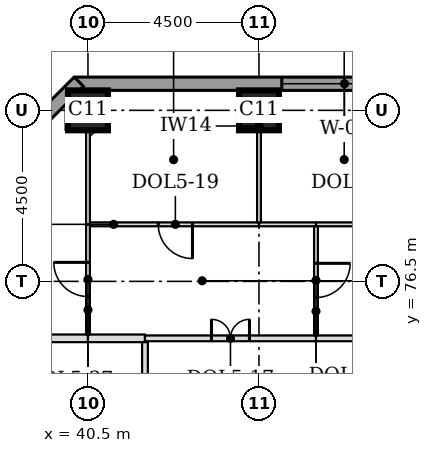
"""IFC4 building model, lengths in metres.
Left out: names, types, materials, properties, quantities, classifications, styles, units other than length and angle.
Written with IfcOpenShell. Run it as: python <this file> out.ifc"""

import sys

from ifc_helpers import new_model, si_unit, direction, frame, frame_2d, origin, origin_2d, place, context, subcontext, project, spatial, rectangle, extrude, element, fill, save


model = new_model("IFC4")
c1 = context("Model", 3, precision=1e-05, world=origin(), true_north=direction((0.0, 1.0)))
c2 = subcontext(c1, "Body", "Model", "MODEL_VIEW")
j1 = project(units=[si_unit("LENGTHUNIT", "METRE"), si_unit("PLANEANGLEUNIT", "RADIAN")], contexts=[c1])
p1 = place(None, origin())
s1 = spatial("IfcSite", under=j1, at=p1, CompositionType="ELEMENT")
p2 = place(p1, origin())
s2 = spatial("IfcBuilding", under=s1, at=p2, CompositionType="ELEMENT")
p3 = place(p2, frame((0.0, 0.0, 108.5)))
s3 = spatial("IfcBuildingStorey", under=s2, at=p3, CompositionType="ELEMENT", Elevation=108.5)
for number, where, z_axis, x_axis in (
    (1, (40.5, 81.0, 0.0), (0.0, 0.0, 1.0), (1.0, 0.0, 0.0)),
    (2, (45.0, 81.0, 0.0), (0.0, 0.0, 1.0), (1.0, 0.0, 0.0)),
):
    element("IfcColumn", number, at=place(p3, frame(where, z_axis=z_axis, x_axis=x_axis)), inside=s3, PredefinedType="COLUMN", context=c2, shape_type="SweptSolid", body=[
        extrude(rectangle(XDim=1.05, YDim=1.05, at=origin_2d()), origin(), (0.0, 0.0, 1.0), 3.7),
    ])
p4 = place(p3, frame((72.362, 81.7, 0.0), z_axis=(0.0, 0.0, 1.0), x_axis=(-1.0, 0.0, 0.0)))
e3 = element("IfcWall", 3, at=p4, inside=s3, PredefinedType="STANDARD", context=c2, shape_type="SweptSolid", body=[
    extrude(rectangle(XDim=32.225, YDim=0.35, at=frame_2d((16.112, 0.0))), origin(), (0.0, 0.0, 1.0), 3.525),
])
p5 = place(p4, frame((5.462, 0.0, 0.9)))
e4 = element("IfcOpeningElement", 4, at=p5, cuts=e3, PredefinedType="OPENING", context=c2, shape_type="SweptSolid", body=[
    extrude(rectangle(XDim=3.3, YDim=1.9, at=frame_2d((1.65, 0.95))), frame((0.0, 0.185, 0.0), z_axis=(0.0, -1.0, 0.0), x_axis=(1.0, 0.0, 0.0)), (0.0, 0.0, 1.0), 0.37),
])
p6 = place(p4, frame((9.962, 0.0, 0.9)))
e5 = element("IfcOpeningElement", 5, at=p6, cuts=e3, PredefinedType="OPENING", context=c2, shape_type="SweptSolid", body=[
    extrude(rectangle(XDim=3.3, YDim=1.9, at=frame_2d((1.65, 0.95))), frame((0.0, 0.185, 0.0), z_axis=(0.0, -1.0, 0.0), x_axis=(1.0, 0.0, 0.0)), (0.0, 0.0, 1.0), 0.37),
])
p7 = place(p4, frame((14.462, 0.0, 0.9)))
e6 = element("IfcOpeningElement", 6, at=p7, cuts=e3, PredefinedType="OPENING", context=c2, shape_type="SweptSolid", body=[
    extrude(rectangle(XDim=3.3, YDim=1.9, at=frame_2d((1.65, 0.95))), frame((0.0, 0.185, 0.0), z_axis=(0.0, -1.0, 0.0), x_axis=(1.0, 0.0, 0.0)), (0.0, 0.0, 1.0), 0.37),
])
p8 = place(p4, frame((18.962, 0.0, 0.9)))
e7 = element("IfcOpeningElement", 7, at=p8, cuts=e3, PredefinedType="OPENING", context=c2, shape_type="SweptSolid", body=[
    extrude(rectangle(XDim=3.3, YDim=1.9, at=frame_2d((1.65, 0.95))), frame((0.0, 0.185, 0.0), z_axis=(0.0, -1.0, 0.0), x_axis=(1.0, 0.0, 0.0)), (0.0, 0.0, 1.0), 0.37),
])
p9 = place(p4, frame((23.462, 0.0, 0.9)))
e8 = element("IfcOpeningElement", 8, at=p9, cuts=e3, PredefinedType="OPENING", context=c2, shape_type="SweptSolid", body=[
    extrude(rectangle(XDim=3.3, YDim=1.9, at=frame_2d((1.65, 0.95))), frame((0.0, 0.185, 0.0), z_axis=(0.0, -1.0, 0.0), x_axis=(1.0, 0.0, 0.0)), (0.0, 0.0, 1.0), 0.37),
])
p10 = place(p3, frame((40.261, 81.751, 0.0), z_axis=(0.0, 0.0, 1.0), x_axis=(-0.707106781187, -0.707106781187, 0.0)))
e9 = element("IfcWall", 9, at=p10, inside=s3, PredefinedType="STANDARD", context=c2, shape_type="SweptSolid", body=[
    extrude(rectangle(XDim=7.089, YDim=0.35, at=frame_2d((3.544, 0.0))), origin(), (0.0, 0.0, 1.0), 3.525),
])
p11 = place(p10, frame((1.894, 0.0, 0.9)))
e10 = element("IfcOpeningElement", 10, at=p11, cuts=e9, PredefinedType="OPENING", context=c2, shape_type="SweptSolid", body=[
    extrude(rectangle(XDim=3.3, YDim=1.9, at=frame_2d((1.65, 0.95))), frame((0.0, 0.185, 0.0), z_axis=(0.0, -1.0, 0.0), x_axis=(1.0, 0.0, 0.0)), (0.0, 0.0, 1.0), 0.37),
])
p12 = place(p3, frame((35.475, 75.0, 0.0), z_axis=(0.0, 0.0, 1.0), x_axis=(1.0, 0.0, 0.0)))
e11 = element("IfcWall", 11, at=p12, inside=s3, PredefinedType="PARTITIONING", context=c2, shape_type="SweptSolid", body=[
    extrude(rectangle(XDim=5.025, YDim=0.2, at=frame_2d((2.512, 0.0))), origin(), (0.0, 0.0, 1.0), 3.55),
])
p13 = place(p3, frame((40.5, 75.0, 0.0), z_axis=(0.0, 0.0, 1.0), x_axis=(1.0, 0.0, 0.0)))
e12 = element("IfcWall", 12, at=p13, inside=s3, PredefinedType="PARTITIONING", context=c2, shape_type="SweptSolid", body=[
    extrude(rectangle(XDim=1.5, YDim=0.2, at=frame_2d((0.75, 0.0))), origin(), (0.0, 0.0, 1.0), 3.55),
])
p14 = place(p3, frame((42.0, 75.0, 0.0), z_axis=(0.0, 0.0, 1.0), x_axis=(1.0, 0.0, 0.0)))
e13 = element("IfcWall", 13, at=p14, inside=s3, PredefinedType="PARTITIONING", context=c2, shape_type="SweptSolid", body=[
    extrude(rectangle(XDim=4.5, YDim=0.15, at=frame_2d((2.25, 0.0))), origin(), (0.0, 0.0, 1.0), 3.55),
])
p15 = place(p14, frame((1.75, 0.0, 0.0)))
e14 = element("IfcOpeningElement", 14, at=p15, cuts=e13, PredefinedType="OPENING", context=c2, shape_type="SweptSolid", body=[
    extrude(rectangle(XDim=1.0, YDim=2.1, at=frame_2d((0.5, 1.05))), frame((0.0, 0.085, 0.0), z_axis=(0.0, -1.0, 0.0), x_axis=(1.0, 0.0, 0.0)), (0.0, 0.0, 1.0), 0.17),
])
p16 = place(p3, frame((46.5, 75.0, 0.0), z_axis=(0.0, 0.0, 1.0), x_axis=(1.0, 0.0, 0.0)))
e15 = element("IfcWall", 15, at=p16, inside=s3, PredefinedType="PARTITIONING", context=c2, shape_type="SweptSolid", body=[
    extrude(rectangle(XDim=13.5, YDim=0.15, at=frame_2d((6.75, 0.0))), origin(), (0.0, 0.0, 1.0), 3.55),
])
p17 = place(p3, frame((40.55, 78.0, 0.0), z_axis=(0.0, 0.0, 1.0), x_axis=(1.0, 0.0, 0.0)))
e16 = element("IfcWall", 16, at=p17, inside=s3, PredefinedType="PARTITIONING", context=c2, shape_type="SweptSolid", body=[
    extrude(rectangle(XDim=4.45, YDim=0.1, at=frame_2d((2.225, 0.0))), origin(), (0.0, 0.0, 1.0), 3.55),
])
p18 = place(p17, frame((1.8, 0.0, 0.0)))
e17 = element("IfcOpeningElement", 17, at=p18, cuts=e16, PredefinedType="OPENING", context=c2, shape_type="SweptSolid", body=[
    extrude(rectangle(XDim=0.9, YDim=2.1, at=frame_2d((0.45, 1.05))), frame((0.0, 0.06, 0.0), z_axis=(0.0, -1.0, 0.0), x_axis=(1.0, 0.0, 0.0)), (0.0, 0.0, 1.0), 0.12),
])
p19 = place(p3, frame((45.0, 78.0, 0.0), z_axis=(0.0, 0.0, 1.0), x_axis=(1.0, 0.0, 0.0)))
e18 = element("IfcWall", 18, at=p19, inside=s3, PredefinedType="PARTITIONING", context=c2, shape_type="SweptSolid", body=[
    extrude(rectangle(XDim=1.5, YDim=0.1, at=frame_2d((0.75, 0.0))), origin(), (0.0, 0.0, 1.0), 3.55),
])
p20 = place(p3, frame((46.5, 78.0, 0.0), z_axis=(0.0, 0.0, 1.0), x_axis=(1.0, 0.0, 0.0)))
e19 = element("IfcWall", 19, at=p20, inside=s3, PredefinedType="PARTITIONING", context=c2, shape_type="SweptSolid", body=[
    extrude(rectangle(XDim=3.0, YDim=0.1, at=frame_2d((1.5, 0.0))), origin(), (0.0, 0.0, 1.0), 3.55),
])
p21 = place(p20, frame((1.05, 0.0, 0.0)))
e20 = element("IfcOpeningElement", 20, at=p21, cuts=e19, PredefinedType="OPENING", context=c2, shape_type="SweptSolid", body=[
    extrude(rectangle(XDim=0.9, YDim=2.1, at=frame_2d((0.45, 1.05))), frame((0.0, 0.06, 0.0), z_axis=(0.0, -1.0, 0.0), x_axis=(1.0, 0.0, 0.0)), (0.0, 0.0, 1.0), 0.12),
])
p22 = place(p3, frame((42.0, 57.075, 0.0), z_axis=(0.0, 0.0, 1.0), x_axis=(0.0, 1.0, 0.0)))
e21 = element("IfcWall", 21, at=p22, inside=s3, PredefinedType="PARTITIONING", context=c2, shape_type="SweptSolid", body=[
    extrude(rectangle(XDim=17.825, YDim=0.15, at=frame_2d((8.913, 0.0))), origin(), (0.0, 0.0, 1.0), 3.55),
])
p23 = place(p3, frame((46.5, 75.075, 0.0), z_axis=(0.0, 0.0, 1.0), x_axis=(0.0, 1.0, 0.0)))
e22 = element("IfcWall", 22, at=p23, inside=s3, PredefinedType="PARTITIONING", context=c2, shape_type="SweptSolid", body=[
    extrude(rectangle(XDim=2.875, YDim=0.1, at=frame_2d((1.438, 0.0))), origin(), (0.0, 0.0, 1.0), 3.022),
])
p24 = place(p23, frame((1.0, 0.0, 0.0)))
e23 = element("IfcOpeningElement", 23, at=p24, cuts=e22, PredefinedType="OPENING", context=c2, shape_type="SweptSolid", body=[
    extrude(rectangle(XDim=0.9, YDim=2.1, at=frame_2d((0.45, 1.05))), frame((0.0, 0.06, 0.0), z_axis=(0.0, -1.0, 0.0), x_axis=(1.0, 0.0, 0.0)), (0.0, 0.0, 1.0), 0.12),
])
p25 = place(p3, frame((40.5, 75.1, 0.0), z_axis=(0.0, 0.0, 1.0), x_axis=(0.0, 1.0, 0.0)))
e24 = element("IfcWall", 24, at=p25, inside=s3, PredefinedType="PARTITIONING", context=c2, shape_type="SweptSolid", body=[
    extrude(rectangle(XDim=2.9, YDim=0.1, at=frame_2d((1.45, 0.0))), origin(), (0.0, 0.0, 1.0), 3.55),
])
p26 = place(p25, frame((1.0, 0.0, 0.0)))
e25 = element("IfcOpeningElement", 25, at=p26, cuts=e24, PredefinedType="OPENING", context=c2, shape_type="SweptSolid", body=[
    extrude(rectangle(XDim=0.9, YDim=2.1, at=frame_2d((0.45, 1.05))), frame((0.0, 0.06, 0.0), z_axis=(0.0, -1.0, 0.0), x_axis=(1.0, 0.0, 0.0)), (0.0, 0.0, 1.0), 0.12),
])
p27 = place(p3, frame((40.5, 78.0, 0.0), z_axis=(0.0, 0.0, 1.0), x_axis=(0.0, 1.0, 0.0)))
e26 = element("IfcWall", 26, at=p27, inside=s3, PredefinedType="PARTITIONING", context=c2, shape_type="SweptSolid", body=[
    extrude(rectangle(XDim=2.475, YDim=0.1, at=frame_2d((1.238, 0.0))), origin(), (0.0, 0.0, 1.0), 3.55),
])
p28 = place(p3, frame((45.0, 78.05, 0.0), z_axis=(0.0, 0.0, 1.0), x_axis=(0.0, 1.0, 0.0)))
e27 = element("IfcWall", 27, at=p28, inside=s3, PredefinedType="PARTITIONING", context=c2, shape_type="SweptSolid", body=[
    extrude(rectangle(XDim=3.475, YDim=0.1, at=frame_2d((1.737, 0.0))), origin(), (0.0, 0.0, 1.0), 3.55),
])
p29 = place(p9, origin())
e28 = element("IfcWindow", 28, at=p29, inside=s3, PartitioningType="SINGLE_PANEL", PredefinedType="WINDOW", context=c2, shape_type="SweptSolid", body=[
    extrude(rectangle(XDim=3.3, YDim=1.9, at=frame_2d((1.65, 0.95))), frame((0.0, 0.085, 0.0), z_axis=(0.0, -1.0, 0.0), x_axis=(1.0, 0.0, 0.0)), (0.0, 0.0, 1.0), 0.06),
])
fill(e8, e28)
p30 = place(p15, origin())
e29 = element("IfcDoor", 29, at=p30, inside=s3, OperationType="DOUBLE_DOOR_SINGLE_SWING", PredefinedType="DOOR", context=c2, shape_type="SweptSolid", body=[
    extrude(rectangle(XDim=1.0, YDim=2.1, at=frame_2d((0.5, 1.05))), frame((0.0, 0.025, 0.0), z_axis=(0.0, -1.0, 0.0), x_axis=(1.0, 0.0, 0.0)), (0.0, 0.0, 1.0), 0.05),
])
fill(e14, e29)
p31 = place(p24, frame((0.9, 0.0, 0.0), z_axis=(0.0, 0.0, 1.0), x_axis=(-1.0, 0.0, 0.0)))
e30 = element("IfcDoor", 30, at=p31, inside=s3, OperationType="SINGLE_SWING_LEFT", PredefinedType="DOOR", context=c2, shape_type="SweptSolid", body=[
    extrude(rectangle(XDim=0.9, YDim=2.1, at=frame_2d((0.45, 1.05))), frame((0.0, 0.025, 0.0), z_axis=(0.0, -1.0, 0.0), x_axis=(1.0, 0.0, 0.0)), (0.0, 0.0, 1.0), 0.05),
])
fill(e23, e30)
p32 = place(p26, origin())
e31 = element("IfcDoor", 31, at=p32, inside=s3, OperationType="SINGLE_SWING_RIGHT", PredefinedType="DOOR", context=c2, shape_type="SweptSolid", body=[
    extrude(rectangle(XDim=0.9, YDim=2.1, at=frame_2d((0.45, 1.05))), frame((0.0, 0.025, 0.0), z_axis=(0.0, -1.0, 0.0), x_axis=(1.0, 0.0, 0.0)), (0.0, 0.0, 1.0), 0.05),
])
fill(e25, e31)
p33 = place(p18, frame((0.9, 0.0, 0.0), z_axis=(0.0, 0.0, 1.0), x_axis=(-1.0, 0.0, 0.0)))
e32 = element("IfcDoor", 32, at=p33, inside=s3, OperationType="SINGLE_SWING_LEFT", PredefinedType="DOOR", context=c2, shape_type="SweptSolid", body=[
    extrude(rectangle(XDim=0.9, YDim=2.1, at=frame_2d((0.45, 1.05))), frame((0.0, 0.025, 0.0), z_axis=(0.0, -1.0, 0.0), x_axis=(1.0, 0.0, 0.0)), (0.0, 0.0, 1.0), 0.05),
])
fill(e17, e32)
save(model, sys.argv[1])
